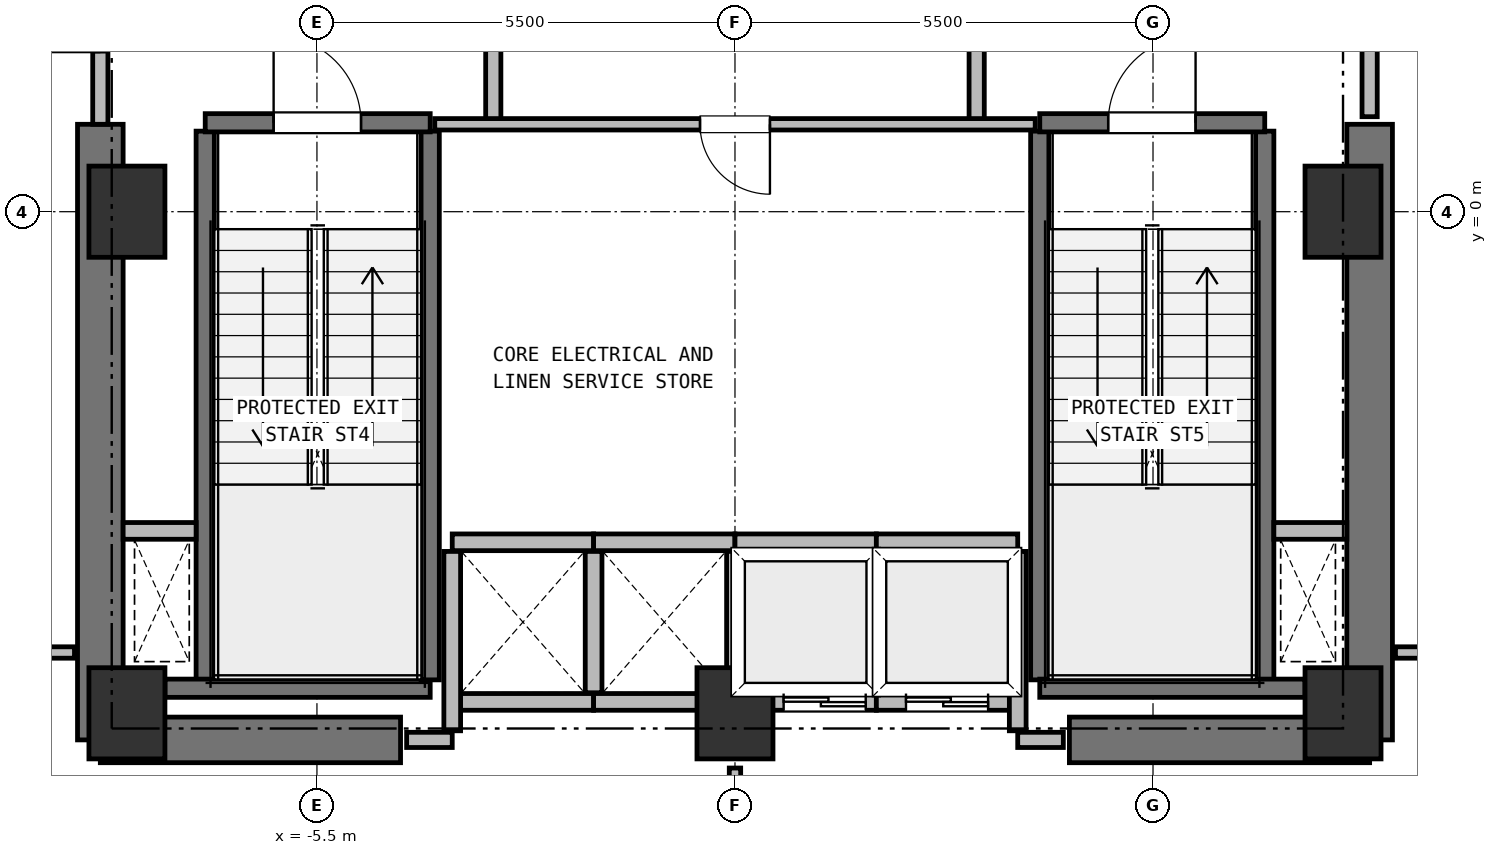
"""IFC4 building model, lengths in metres.
Left out: names, types, materials, properties, quantities, classifications, styles, units other than length and angle.
Written with IfcOpenShell. Run it as: python <this file> out.ifc"""

import sys

from ifc_helpers import new_model, si_unit, direction, frame, frame_2d, origin, origin_2d, place, context, subcontext, project, spatial, rectangle, extrude, element, fill, save


model = new_model("IFC4")
c1 = context("Model", 3, precision=1e-05, world=origin(), true_north=direction((0.0, 1.0)))
c2 = subcontext(c1, "Body", "Model", "MODEL_VIEW")
j1 = project(units=[si_unit("LENGTHUNIT", "METRE"), si_unit("PLANEANGLEUNIT", "RADIAN")], contexts=[c1])
p1 = place(None, origin())
s1 = spatial("IfcSite", under=j1, at=p1, CompositionType="ELEMENT")
p2 = place(p1, origin())
s2 = spatial("IfcBuilding", under=s1, at=p2, CompositionType="ELEMENT")
p3 = place(p2, frame((0.0, 0.0, 92.75)))
s3 = spatial("IfcBuildingStorey", under=s2, at=p3, CompositionType="ELEMENT", Elevation=92.75)
for number, where, z_axis, x_axis in (
    (1, (-8.0, -6.6, 0.0), (0.0, 0.0, 1.0), (1.0, 0.0, 0.0)),
    (2, (0.0, -6.6, 0.0), (0.0, 0.0, 1.0), (1.0, 0.0, 0.0)),
    (3, (8.0, -6.6, 0.0), (0.0, 0.0, 1.0), (1.0, 0.0, 0.0)),
    (4, (8.0, 0.0, 0.0), (0.0, 0.0, 1.0), (1.0, 0.0, 0.0)),
    (5, (-8.0, 0.0, 0.0), (0.0, 0.0, 1.0), (1.0, 0.0, 0.0)),
):
    element("IfcColumn", number, at=place(p3, frame(where, z_axis=z_axis, x_axis=x_axis)), inside=s3, PredefinedType="COLUMN", context=c2, shape_type="SweptSolid", body=[
        extrude(rectangle(XDim=1.0, YDim=1.2, at=origin_2d()), origin(), (0.0, 0.0, 1.0), 4.5),
    ])
for number, where, z_axis, x_axis in (
    (6, (-8.35, -6.95, 0.0), (0.0, 0.0, 1.0), (1.0, 0.0, 0.0)),
    (7, (4.4, -6.95, 0.0), (0.0, 0.0, 1.0), (1.0, 0.0, 0.0)),
):
    element("IfcWall", number, at=place(p3, frame(where, z_axis=z_axis, x_axis=x_axis)), inside=s3, PredefinedType="SHEAR", context=c2, shape_type="SweptSolid", body=[
        extrude(rectangle(XDim=3.95, YDim=0.6, at=frame_2d((1.975, 0.0))), origin(), (0.0, 0.0, 1.0), 4.25),
    ])
for number, where, z_axis, x_axis in (
    (8, (-8.35, -6.95, 0.0), (0.0, 0.0, 1.0), (0.0, 1.0, 0.0)),
    (9, (8.35, -6.95, 0.0), (0.0, 0.0, 1.0), (0.0, 1.0, 0.0)),
):
    element("IfcWall", number, at=place(p3, frame(where, z_axis=z_axis, x_axis=x_axis)), inside=s3, PredefinedType="SHEAR", context=c2, shape_type="SweptSolid", body=[
        extrude(rectangle(XDim=8.1, YDim=0.6, at=frame_2d((4.05, 0.0))), origin(), (0.0, 0.0, 1.0), 4.25),
    ])
p4 = place(p3, frame((-6.97, -6.16, 0.0), z_axis=(0.0, 0.0, 1.0), x_axis=(0.0, 1.0, 0.0)))
e10 = element("IfcWall", 10, at=p4, inside=s3, PredefinedType="SHEAR", context=c2, shape_type="SweptSolid", body=[
    extrude(rectangle(XDim=7.22, YDim=0.24, at=frame_2d((3.61, 0.0))), origin(), (0.0, 0.0, 1.0), 4.25),
])
p5 = place(p3, frame((-7.5, -6.27, 0.0), z_axis=(0.0, 0.0, 1.0), x_axis=(1.0, 0.0, 0.0)))
e11 = element("IfcWall", 11, at=p5, inside=s3, PredefinedType="SHEAR", context=c2, shape_type="SweptSolid", body=[
    extrude(rectangle(XDim=3.49, YDim=0.24, at=frame_2d((1.745, 0.0))), origin(), (0.0, 0.0, 1.0), 4.25),
])
p6 = place(p3, frame((-4.01, -6.16, 0.0), z_axis=(0.0, 0.0, 1.0), x_axis=(0.0, 1.0, 0.0)))
e12 = element("IfcWall", 12, at=p6, inside=s3, PredefinedType="SHEAR", context=c2, shape_type="SweptSolid", body=[
    extrude(rectangle(XDim=7.22, YDim=0.24, at=frame_2d((3.61, 0.0))), origin(), (0.0, 0.0, 1.0), 4.25),
])
p7 = place(p3, frame((-6.97, 1.17, 0.0), z_axis=(0.0, 0.0, 1.0), x_axis=(1.0, 0.0, 0.0)))
e13 = element("IfcWall", 13, at=p7, inside=s3, PredefinedType="SHEAR", context=c2, shape_type="SweptSolid", body=[
    extrude(rectangle(XDim=2.96, YDim=0.24, at=frame_2d((1.48, 0.0))), origin(), (0.0, 0.0, 1.0), 4.25),
])
p8 = place(p7, frame((0.9, 0.0, 0.0)))
e14 = element("IfcOpeningElement", 14, at=p8, cuts=e13, PredefinedType="OPENING", context=c2, shape_type="SweptSolid", body=[
    extrude(rectangle(XDim=1.15, YDim=2.15, at=frame_2d((0.575, 1.075))), frame((0.0, 0.13, 0.0), z_axis=(0.0, -1.0, 0.0), x_axis=(1.0, 0.0, 0.0)), (0.0, 0.0, 1.0), 0.26),
])
for number, where, z_axis, x_axis in (
    (15, (4.01, -6.16, 0.0), (0.0, 0.0, 1.0), (0.0, 1.0, 0.0)),
    (16, (6.97, -6.16, 0.0), (0.0, 0.0, 1.0), (0.0, 1.0, 0.0)),
):
    element("IfcWall", number, at=place(p3, frame(where, z_axis=z_axis, x_axis=x_axis)), inside=s3, PredefinedType="SHEAR", context=c2, shape_type="SweptSolid", body=[
        extrude(rectangle(XDim=7.22, YDim=0.24, at=frame_2d((3.61, 0.0))), origin(), (0.0, 0.0, 1.0), 4.25),
    ])
p9 = place(p3, frame((4.01, -6.27, 0.0), z_axis=(0.0, 0.0, 1.0), x_axis=(1.0, 0.0, 0.0)))
e17 = element("IfcWall", 17, at=p9, inside=s3, PredefinedType="SHEAR", context=c2, shape_type="SweptSolid", body=[
    extrude(rectangle(XDim=3.49, YDim=0.24, at=frame_2d((1.745, 0.0))), origin(), (0.0, 0.0, 1.0), 4.25),
])
p10 = place(p3, frame((4.01, 1.17, 0.0), z_axis=(0.0, 0.0, 1.0), x_axis=(1.0, 0.0, 0.0)))
e18 = element("IfcWall", 18, at=p10, inside=s3, PredefinedType="SHEAR", context=c2, shape_type="SweptSolid", body=[
    extrude(rectangle(XDim=2.96, YDim=0.24, at=frame_2d((1.48, 0.0))), origin(), (0.0, 0.0, 1.0), 4.25),
])
p11 = place(p10, frame((0.9, 0.0, 0.0)))
e19 = element("IfcOpeningElement", 19, at=p11, cuts=e18, PredefinedType="OPENING", context=c2, shape_type="SweptSolid", body=[
    extrude(rectangle(XDim=1.15, YDim=2.15, at=frame_2d((0.575, 1.075))), frame((0.0, 0.13, 0.0), z_axis=(0.0, -1.0, 0.0), x_axis=(1.0, 0.0, 0.0)), (0.0, 0.0, 1.0), 0.26),
])
for number, where, z_axis, x_axis in (
    (20, (-8.05, -4.2, 0.0), (0.0, 0.0, 1.0), (1.0, 0.0, 0.0)),
    (21, (7.09, -4.2, 0.0), (0.0, 0.0, 1.0), (1.0, 0.0, 0.0)),
):
    element("IfcWall", number, at=place(p3, frame(where, z_axis=z_axis, x_axis=x_axis)), inside=s3, PredefinedType="PARTITIONING", context=c2, shape_type="SweptSolid", body=[
        extrude(rectangle(XDim=0.96, YDim=0.22, at=frame_2d((0.48, 0.0))), origin(), (0.0, 0.0, 1.0), 4.25),
    ])
p12 = place(p3, frame((-3.72, -6.45, 0.0), z_axis=(0.0, 0.0, 1.0), x_axis=(1.0, 0.0, 0.0)))
e22 = element("IfcWall", 22, at=p12, inside=s3, PredefinedType="PARTITIONING", context=c2, shape_type="SweptSolid", body=[
    extrude(rectangle(XDim=1.86, YDim=0.22, at=frame_2d((0.93, 0.0))), origin(), (0.0, 0.0, 1.0), 3.87),
])
p13 = place(p3, frame((-3.72, -4.35, 0.0), z_axis=(0.0, 0.0, 1.0), x_axis=(1.0, 0.0, 0.0)))
e23 = element("IfcWall", 23, at=p13, inside=s3, PredefinedType="PARTITIONING", context=c2, shape_type="SweptSolid", body=[
    extrude(rectangle(XDim=1.86, YDim=0.22, at=frame_2d((0.93, 0.0))), origin(), (0.0, 0.0, 1.0), 4.25),
])
p14 = place(p3, frame((-3.72, -6.83, 0.0), z_axis=(0.0, 0.0, 1.0), x_axis=(0.0, 1.0, 0.0)))
e24 = element("IfcWall", 24, at=p14, inside=s3, PredefinedType="PARTITIONING", context=c2, shape_type="SweptSolid", body=[
    extrude(rectangle(XDim=2.36, YDim=0.22, at=frame_2d((1.18, 0.0))), origin(), (0.0, 0.0, 1.0), 4.25),
])
p15 = place(p3, frame((-1.86, -6.33, 0.0), z_axis=(0.0, 0.0, 1.0), x_axis=(0.0, 1.0, 0.0)))
e25 = element("IfcWall", 25, at=p15, inside=s3, PredefinedType="PARTITIONING", context=c2, shape_type="SweptSolid", body=[
    extrude(rectangle(XDim=1.86, YDim=0.22, at=frame_2d((0.93, 0.0))), origin(), (0.0, 0.0, 1.0), 4.25),
])
p16 = place(p3, frame((-1.86, -6.45, 0.0), z_axis=(0.0, 0.0, 1.0), x_axis=(1.0, 0.0, 0.0)))
e26 = element("IfcWall", 26, at=p16, inside=s3, PredefinedType="PARTITIONING", context=c2, shape_type="SweptSolid", body=[
    extrude(rectangle(XDim=1.86, YDim=0.22, at=frame_2d((0.93, 0.0))), origin(), (0.0, 0.0, 1.0), 3.87),
])
for number, where, z_axis, x_axis in (
    (27, (-1.86, -4.35, 0.0), (0.0, 0.0, 1.0), (1.0, 0.0, 0.0)),
    (28, (0.0, -6.33, 0.0), (0.0, 0.0, 1.0), (0.0, 1.0, 0.0)),
):
    element("IfcWall", number, at=place(p3, frame(where, z_axis=z_axis, x_axis=x_axis)), inside=s3, PredefinedType="PARTITIONING", context=c2, shape_type="SweptSolid", body=[
        extrude(rectangle(XDim=1.86, YDim=0.22, at=frame_2d((0.93, 0.0))), origin(), (0.0, 0.0, 1.0), 4.25),
    ])
p17 = place(p3, frame((0.0, -6.45, 0.0), z_axis=(0.0, 0.0, 1.0), x_axis=(1.0, 0.0, 0.0)))
e29 = element("IfcWall", 29, at=p17, inside=s3, PredefinedType="PARTITIONING", context=c2, shape_type="SweptSolid", body=[
    extrude(rectangle(XDim=1.86, YDim=0.22, at=frame_2d((0.93, 0.0))), origin(), (0.0, 0.0, 1.0), 3.87),
])
p18 = place(p17, frame((0.64, 0.0, 0.0)))
e30 = element("IfcOpeningElement", 30, at=p18, cuts=e29, PredefinedType="OPENING", context=c2, shape_type="SweptSolid", body=[
    extrude(rectangle(XDim=1.08, YDim=2.15, at=frame_2d((0.54, 1.075))), frame((0.0, 0.12, 0.0), z_axis=(0.0, -1.0, 0.0), x_axis=(1.0, 0.0, 0.0)), (0.0, 0.0, 1.0), 0.24),
])
for number, where, z_axis, x_axis in (
    (31, (0.0, -4.35, 0.0), (0.0, 0.0, 1.0), (1.0, 0.0, 0.0)),
    (32, (1.86, -6.33, 0.0), (0.0, 0.0, 1.0), (0.0, 1.0, 0.0)),
):
    element("IfcWall", number, at=place(p3, frame(where, z_axis=z_axis, x_axis=x_axis)), inside=s3, PredefinedType="PARTITIONING", context=c2, shape_type="SweptSolid", body=[
        extrude(rectangle(XDim=1.86, YDim=0.22, at=frame_2d((0.93, 0.0))), origin(), (0.0, 0.0, 1.0), 4.25),
    ])
p19 = place(p3, frame((1.86, -6.45, 0.0), z_axis=(0.0, 0.0, 1.0), x_axis=(1.0, 0.0, 0.0)))
e33 = element("IfcWall", 33, at=p19, inside=s3, PredefinedType="PARTITIONING", context=c2, shape_type="SweptSolid", body=[
    extrude(rectangle(XDim=1.86, YDim=0.22, at=frame_2d((0.93, 0.0))), origin(), (0.0, 0.0, 1.0), 3.87),
])
p20 = place(p19, frame((0.39, 0.0, 0.0)))
e34 = element("IfcOpeningElement", 34, at=p20, cuts=e33, PredefinedType="OPENING", context=c2, shape_type="SweptSolid", body=[
    extrude(rectangle(XDim=1.08, YDim=2.15, at=frame_2d((0.54, 1.075))), frame((0.0, 0.12, 0.0), z_axis=(0.0, -1.0, 0.0), x_axis=(1.0, 0.0, 0.0)), (0.0, 0.0, 1.0), 0.24),
])
p21 = place(p3, frame((1.86, -4.35, 0.0), z_axis=(0.0, 0.0, 1.0), x_axis=(1.0, 0.0, 0.0)))
e35 = element("IfcWall", 35, at=p21, inside=s3, PredefinedType="PARTITIONING", context=c2, shape_type="SweptSolid", body=[
    extrude(rectangle(XDim=1.86, YDim=0.22, at=frame_2d((0.93, 0.0))), origin(), (0.0, 0.0, 1.0), 4.25),
])
p22 = place(p3, frame((3.72, -6.83, 0.0), z_axis=(0.0, 0.0, 1.0), x_axis=(0.0, 1.0, 0.0)))
e36 = element("IfcWall", 36, at=p22, inside=s3, PredefinedType="PARTITIONING", context=c2, shape_type="SweptSolid", body=[
    extrude(rectangle(XDim=2.36, YDim=0.22, at=frame_2d((1.18, 0.0))), origin(), (0.0, 0.0, 1.0), 4.25),
])
p23 = place(p3, frame((-3.18, 1.15, 0.0), z_axis=(0.0, 0.0, 1.0), x_axis=(0.0, 1.0, 0.0)))
e37 = element("IfcWall", 37, at=p23, inside=s3, PredefinedType="PARTITIONING", context=c2, shape_type="SweptSolid", body=[
    extrude(rectangle(XDim=3.3, YDim=0.2, at=frame_2d((1.65, 0.0))), origin(), (0.0, 0.0, 1.0), 4.25),
])
p24 = place(p23, frame((1.08, 0.0, 0.0)))
e38 = element("IfcOpeningElement", 38, at=p24, cuts=e37, PredefinedType="OPENING", context=c2, shape_type="SweptSolid", body=[
    extrude(rectangle(XDim=1.15, YDim=2.15, at=frame_2d((0.575, 1.075))), frame((0.0, 0.11, 0.0), z_axis=(0.0, -1.0, 0.0), x_axis=(1.0, 0.0, 0.0)), (0.0, 0.0, 1.0), 0.22),
])
p25 = place(p3, frame((3.18, 1.15, 0.0), z_axis=(0.0, 0.0, 1.0), x_axis=(0.0, 1.0, 0.0)))
e39 = element("IfcWall", 39, at=p25, inside=s3, PredefinedType="PARTITIONING", context=c2, shape_type="SweptSolid", body=[
    extrude(rectangle(XDim=3.3, YDim=0.2, at=frame_2d((1.65, 0.0))), origin(), (0.0, 0.0, 1.0), 4.25),
])
p26 = place(p25, frame((1.08, 0.0, 0.0)))
e40 = element("IfcOpeningElement", 40, at=p26, cuts=e39, PredefinedType="OPENING", context=c2, shape_type="SweptSolid", body=[
    extrude(rectangle(XDim=1.15, YDim=2.15, at=frame_2d((0.575, 1.075))), frame((0.0, 0.11, 0.0), z_axis=(0.0, -1.0, 0.0), x_axis=(1.0, 0.0, 0.0)), (0.0, 0.0, 1.0), 0.22),
])
p27 = place(p3, frame((-8.35, 1.15, 0.0), z_axis=(0.0, 0.0, 1.0), x_axis=(0.0, 1.0, 0.0)))
e41 = element("IfcWall", 41, at=p27, inside=s3, PredefinedType="PARTITIONING", context=c2, shape_type="SweptSolid", body=[
    extrude(rectangle(XDim=5.4, YDim=0.2, at=frame_2d((2.7, 0.0))), origin(), (0.0, 0.0, 1.0), 4.25),
])
p28 = place(p27, frame((0.95, 0.0, 0.0)))
e42 = element("IfcOpeningElement", 42, at=p28, cuts=e41, PredefinedType="OPENING", context=c2, shape_type="SweptSolid", body=[
    extrude(rectangle(XDim=1.15, YDim=2.15, at=frame_2d((0.575, 1.075))), frame((0.0, 0.11, 0.0), z_axis=(0.0, -1.0, 0.0), x_axis=(1.0, 0.0, 0.0)), (0.0, 0.0, 1.0), 0.22),
])
p29 = place(p3, frame((8.35, 1.25, 0.0), z_axis=(0.0, 0.0, 1.0), x_axis=(0.0, 1.0, 0.0)))
e43 = element("IfcWall", 43, at=p29, inside=s3, PredefinedType="PARTITIONING", context=c2, shape_type="SweptSolid", body=[
    extrude(rectangle(XDim=5.3, YDim=0.2, at=frame_2d((2.65, 0.0))), origin(), (0.0, 0.0, 1.0), 4.25),
])
p30 = place(p29, frame((0.95, 0.0, 0.0)))
e44 = element("IfcOpeningElement", 44, at=p30, cuts=e43, PredefinedType="OPENING", context=c2, shape_type="SweptSolid", body=[
    extrude(rectangle(XDim=1.15, YDim=2.15, at=frame_2d((0.575, 1.075))), frame((0.0, 0.11, 0.0), z_axis=(0.0, -1.0, 0.0), x_axis=(1.0, 0.0, 0.0)), (0.0, 0.0, 1.0), 0.22),
])
p31 = place(p3, frame((3.95, 1.15, 0.0), z_axis=(0.0, 0.0, 1.0), x_axis=(-1.0, 0.0, 0.0)))
e45 = element("IfcWall", 45, at=p31, inside=s3, PredefinedType="PARTITIONING", context=c2, shape_type="SweptSolid", body=[
    extrude(rectangle(XDim=7.9, YDim=0.15, at=frame_2d((3.95, 0.0))), origin(), (0.0, 0.0, 1.0), 4.25),
])
p32 = place(p31, frame((3.49, 0.0, 0.0)))
e46 = element("IfcOpeningElement", 46, at=p32, cuts=e45, PredefinedType="OPENING", context=c2, shape_type="SweptSolid", body=[
    extrude(rectangle(XDim=0.92, YDim=2.05, at=frame_2d((0.46, 1.025))), frame((0.0, 0.085, 0.0), z_axis=(0.0, -1.0, 0.0), x_axis=(1.0, 0.0, 0.0)), (0.0, 0.0, 1.0), 0.17),
])
for number, where, z_axis, x_axis in (
    (47, (-4.32, -6.95, 0.0), (0.0, 0.0, 1.0), (1.0, 0.0, 0.0)),
    (48, (3.72, -6.95, 0.0), (0.0, 0.0, 1.0), (1.0, 0.0, 0.0)),
):
    element("IfcWall", number, at=place(p3, frame(where, z_axis=z_axis, x_axis=x_axis)), inside=s3, PredefinedType="PARTITIONING", context=c2, shape_type="SweptSolid", body=[
        extrude(rectangle(XDim=0.6, YDim=0.2, at=frame_2d((0.3, 0.0))), origin(), (0.0, 0.0, 1.0), 4.25),
    ])
p33 = place(p3, frame((-8.69, -5.8, 0.0), z_axis=(0.0, 0.0, 1.0), x_axis=(-1.0, 0.0, 0.0)))
e49 = element("IfcWall", 49, at=p33, inside=s3, PredefinedType="PARTITIONING", context=c2, shape_type="SweptSolid", body=[
    extrude(rectangle(XDim=2.02, YDim=0.15, at=frame_2d((1.01, 0.0))), origin(), (0.0, 0.0, 1.0), 4.25),
])
p34 = place(p33, frame((0.55, 0.0, 0.0)))
e50 = element("IfcOpeningElement", 50, at=p34, cuts=e49, PredefinedType="OPENING", context=c2, shape_type="SweptSolid", body=[
    extrude(rectangle(XDim=1.0, YDim=2.15, at=frame_2d((0.5, 1.075))), frame((0.0, 0.085, 0.0), z_axis=(0.0, -1.0, 0.0), x_axis=(1.0, 0.0, 0.0)), (0.0, 0.0, 1.0), 0.17),
])
p35 = place(p3, frame((10.71, -5.8, 0.0), z_axis=(0.0, 0.0, 1.0), x_axis=(-1.0, 0.0, 0.0)))
e51 = element("IfcWall", 51, at=p35, inside=s3, PredefinedType="PARTITIONING", context=c2, shape_type="SweptSolid", body=[
    extrude(rectangle(XDim=2.02, YDim=0.15, at=frame_2d((1.01, 0.0))), origin(), (0.0, 0.0, 1.0), 4.25),
])
p36 = place(p35, frame((0.55, 0.0, 0.0)))
e52 = element("IfcOpeningElement", 52, at=p36, cuts=e51, PredefinedType="OPENING", context=c2, shape_type="SweptSolid", body=[
    extrude(rectangle(XDim=1.0, YDim=2.15, at=frame_2d((0.5, 1.075))), frame((0.0, 0.085, 0.0), z_axis=(0.0, -1.0, 0.0), x_axis=(1.0, 0.0, 0.0)), (0.0, 0.0, 1.0), 0.17),
])
p37 = place(p3, frame((0.0, -7.32, 0.0), z_axis=(0.0, 0.0, 1.0), x_axis=(0.0, -1.0, 0.0)))
e53 = element("IfcWall", 53, at=p37, inside=s3, PredefinedType="PARTITIONING", context=c2, shape_type="SweptSolid", body=[
    extrude(rectangle(XDim=10.353, YDim=0.15, at=frame_2d((5.176, 0.0))), origin(), (0.0, 0.0, 1.0), 4.25),
])
p38 = place(p8, origin())
e54 = element("IfcDoor", 54, at=p38, inside=s3, OperationType="SINGLE_SWING_LEFT", PredefinedType="DOOR", context=c2, shape_type="SweptSolid", body=[
    extrude(rectangle(XDim=1.15, YDim=2.15, at=frame_2d((0.575, 1.075))), frame((0.0, 0.025, 0.0), z_axis=(0.0, -1.0, 0.0), x_axis=(1.0, 0.0, 0.0)), (0.0, 0.0, 1.0), 0.05),
])
fill(e14, e54)
p39 = place(p11, origin())
e55 = element("IfcDoor", 55, at=p39, inside=s3, OperationType="SINGLE_SWING_RIGHT", PredefinedType="DOOR", context=c2, shape_type="SweptSolid", body=[
    extrude(rectangle(XDim=1.15, YDim=2.15, at=frame_2d((0.575, 1.075))), frame((0.0, 0.025, 0.0), z_axis=(0.0, -1.0, 0.0), x_axis=(1.0, 0.0, 0.0)), (0.0, 0.0, 1.0), 0.05),
])
fill(e19, e55)
p40 = place(p18, origin())
e56 = element("IfcDoor", 56, at=p40, inside=s3, OperationType="DOUBLE_DOOR_SLIDING", PredefinedType="DOOR", context=c2, shape_type="SweptSolid", body=[
    extrude(rectangle(XDim=1.08, YDim=2.15, at=frame_2d((0.54, 1.075))), frame((0.0, 0.025, 0.0), z_axis=(0.0, -1.0, 0.0), x_axis=(1.0, 0.0, 0.0)), (0.0, 0.0, 1.0), 0.05),
])
fill(e30, e56)
p41 = place(p20, origin())
e57 = element("IfcDoor", 57, at=p41, inside=s3, OperationType="DOUBLE_DOOR_SLIDING", PredefinedType="DOOR", context=c2, shape_type="SweptSolid", body=[
    extrude(rectangle(XDim=1.08, YDim=2.15, at=frame_2d((0.54, 1.075))), frame((0.0, 0.025, 0.0), z_axis=(0.0, -1.0, 0.0), x_axis=(1.0, 0.0, 0.0)), (0.0, 0.0, 1.0), 0.05),
])
fill(e34, e57)
p42 = place(p28, origin())
e58 = element("IfcDoor", 58, at=p42, inside=s3, OperationType="SINGLE_SWING_LEFT", PredefinedType="DOOR", context=c2, shape_type="SweptSolid", body=[
    extrude(rectangle(XDim=1.15, YDim=2.15, at=frame_2d((0.575, 1.075))), frame((0.0, 0.025, 0.0), z_axis=(0.0, -1.0, 0.0), x_axis=(1.0, 0.0, 0.0)), (0.0, 0.0, 1.0), 0.05),
])
fill(e42, e58)
p43 = place(p32, origin())
e59 = element("IfcDoor", 59, at=p43, inside=s3, OperationType="SINGLE_SWING_LEFT", PredefinedType="DOOR", context=c2, shape_type="SweptSolid", body=[
    extrude(rectangle(XDim=0.92, YDim=2.05, at=frame_2d((0.46, 1.025))), frame((0.0, 0.025, 0.0), z_axis=(0.0, -1.0, 0.0), x_axis=(1.0, 0.0, 0.0)), (0.0, 0.0, 1.0), 0.05),
])
fill(e46, e59)
save(model, sys.argv[1])
